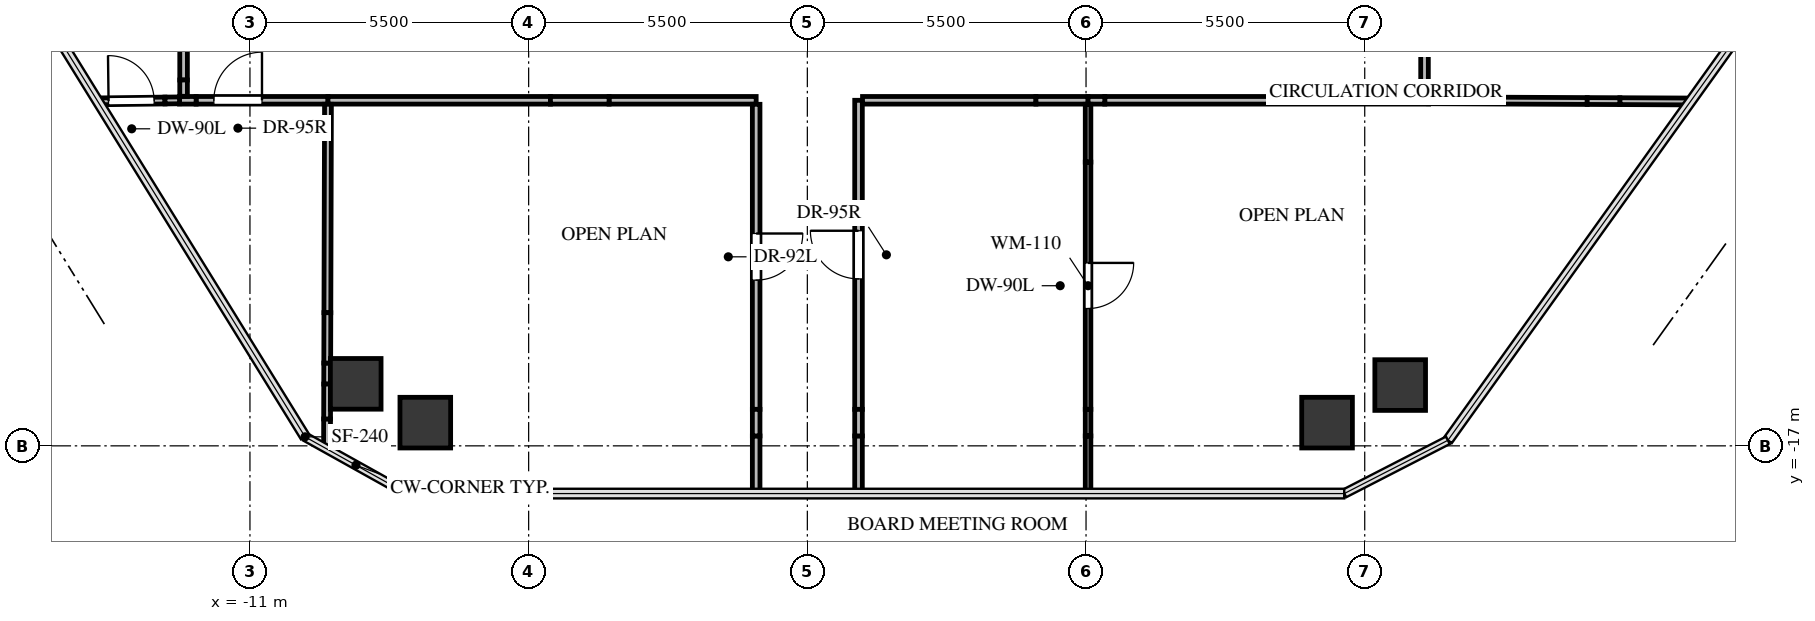
"""IFC4 building model, lengths in metres.
Left out: names, types, materials, properties, quantities, classifications, styles, units other than length and angle.
Written with IfcOpenShell. Run it as: python <this file> out.ifc"""

import sys

from ifc_helpers import new_model, si_unit, direction, frame, frame_2d, origin, origin_2d, place, context, subcontext, project, spatial, rectangle, extrude, source, transform, mapped, element, fill, save


model = new_model("IFC4")
c1 = context("Model", 3, precision=1e-05, world=origin(), true_north=direction((0.0, 1.0)))
c2 = subcontext(c1, "Body", "Model", "MODEL_VIEW")
j1 = project(units=[si_unit("LENGTHUNIT", "METRE"), si_unit("PLANEANGLEUNIT", "RADIAN")], contexts=[c1])
p1 = place(None, origin())
s1 = spatial("IfcSite", under=j1, at=p1, CompositionType="ELEMENT")
p2 = place(p1, origin())
s2 = spatial("IfcBuilding", under=s1, at=p2, CompositionType="ELEMENT")
p3 = place(p2, frame((0.0, 0.0, 200.2)))
s3 = spatial("IfcBuildingStorey", under=s2, at=p3, CompositionType="ELEMENT", Elevation=200.2)
m1 = source(origin(), c2, "Body", "SweptSolid", [
    extrude(rectangle(XDim=1.0, YDim=1.0, at=origin_2d()), origin(), (0.0, 0.0, 1.0), 3.0),
])
for number, where, z_axis, x_axis in (
    (1, (-8.913, -15.776, -0.24), (0.0, 0.0, 1.0), (1.0, 0.0, 0.0)),
    (2, (11.7, -15.8, -0.24), (0.0, 0.0, 1.0), (1.0, 0.0, 0.0)),
    (3, (10.257, -16.542, -0.24), (0.0, 0.0, 1.0), (1.0, 0.0, 0.0)),
    (4, (-7.54, -16.542, -0.24), (0.0, 0.0, 1.0), (1.0, 0.0, 0.0)),
):
    element("IfcColumn", number, at=place(p3, frame(where, z_axis=z_axis, x_axis=x_axis)), inside=s3, PredefinedType="COLUMN", context=c2, shape_type="MappedRepresentation", body=[
        mapped(m1, transform((0.0, 0.0, 0.0), x_axis=(1.0, 0.0, 0.0), y_axis=(0.0, 1.0, 0.0), z_axis=(0.0, 0.0, 1.0), scale=1.0)),
    ])
p4 = place(p3, frame((-12.062, -10.18, 0.0), z_axis=(0.0, 0.0, 1.0), x_axis=(1.0, 0.0, 0.0)))
e5 = element("IfcWall", 5, at=p4, inside=s3, PredefinedType="PARTITIONING", context=c2, shape_type="SweptSolid", body=[
    extrude(rectangle(XDim=2.603, YDim=0.15, at=frame_2d((1.301, 0.0))), origin(), (0.0, 0.0, 1.0), 2.745),
])
p5 = place(p4, frame((0.35, 0.0, 0.0)))
e6 = element("IfcOpeningElement", 6, at=p5, cuts=e5, PredefinedType="OPENING", context=c2, shape_type="SweptSolid", body=[
    extrude(rectangle(XDim=0.95, YDim=2.1, at=frame_2d((0.475, 1.05))), frame((0.0, 0.085, 0.0), z_axis=(0.0, -1.0, 0.0), x_axis=(1.0, 0.0, 0.0)), (0.0, 0.0, 1.0), 0.17),
])
p6 = place(p3, frame((-12.39, -10.18, 0.0), z_axis=(0.0, 0.0, 1.0), x_axis=(1.0, 0.0, 0.0)))
e7 = element("IfcWall", 7, at=p6, inside=s3, PredefinedType="PARTITIONING", context=c2, shape_type="SweptSolid", body=[
    extrude(rectangle(XDim=0.327, YDim=0.15, at=frame_2d((0.164, 0.0))), origin(), (0.0, 0.0, 1.0), 2.099),
])
p7 = place(p3, frame((-9.46, -10.18, 0.0), z_axis=(0.0, 0.0, 1.0), x_axis=(1.0, 0.0, 0.0)))
e8 = element("IfcWall", 8, at=p7, inside=s3, PredefinedType="PARTITIONING", context=c2, shape_type="SweptSolid", body=[
    extrude(rectangle(XDim=4.39, YDim=0.15, at=frame_2d((2.195, 0.0))), origin(), (0.0, 0.0, 1.0), 2.745),
])
p8 = place(p3, frame((-3.913, -10.18, 0.0), z_axis=(0.0, 0.0, 1.0), x_axis=(1.0, 0.0, 0.0)))
e9 = element("IfcWall", 9, at=p8, inside=s3, PredefinedType="PARTITIONING", context=c2, shape_type="SweptSolid", body=[
    extrude(rectangle(XDim=2.903, YDim=0.15, at=frame_2d((1.451, 0.0))), origin(), (0.0, 0.0, 1.0), 2.745),
])
p9 = place(p3, frame((-5.07, -10.18, 0.0), z_axis=(0.0, 0.0, 1.0), x_axis=(1.0, 0.0, 0.0)))
e10 = element("IfcWall", 10, at=p9, inside=s3, PredefinedType="PARTITIONING", context=c2, shape_type="SweptSolid", body=[
    extrude(rectangle(XDim=1.157, YDim=0.15, at=frame_2d((0.579, 0.0))), origin(), (0.0, 0.0, 1.0), 1.942),
])
p10 = place(p3, frame((-1.01, -10.259, 0.0), z_axis=(0.0, 0.0, 1.0), x_axis=(0.0, -1.0, 0.0)))
e11 = element("IfcWall", 11, at=p10, inside=s3, PredefinedType="PARTITIONING", context=c2, shape_type="SweptSolid", body=[
    extrude(rectangle(XDim=6.021, YDim=0.15, at=frame_2d((3.01, 0.0))), origin(), (0.0, 0.0, 1.0), 2.745),
])
p11 = place(p10, frame((2.55, 0.0, 0.0)))
e12 = element("IfcOpeningElement", 12, at=p11, cuts=e11, PredefinedType="OPENING", context=c2, shape_type="SweptSolid", body=[
    extrude(rectangle(XDim=0.92, YDim=2.1, at=frame_2d((0.46, 1.05))), frame((0.0, 0.085, 0.0), z_axis=(0.0, -1.0, 0.0), x_axis=(1.0, 0.0, 0.0)), (0.0, 0.0, 1.0), 0.17),
])
p12 = place(p3, frame((-1.01, -16.804, 0.0), z_axis=(0.0, 0.0, 1.0), x_axis=(0.0, -1.0, 0.0)))
e13 = element("IfcWall", 13, at=p12, inside=s3, PredefinedType="PARTITIONING", context=c2, shape_type="SweptSolid", body=[
    extrude(rectangle(XDim=1.137, YDim=0.15, at=frame_2d((0.569, 0.0))), origin(), (0.0, 0.0, 1.0), 2.745),
])
p13 = place(p3, frame((-1.01, -16.28, 0.0), z_axis=(0.0, 0.0, 1.0), x_axis=(0.0, -1.0, 0.0)))
e14 = element("IfcWall", 14, at=p13, inside=s3, PredefinedType="PARTITIONING", context=c2, shape_type="SweptSolid", body=[
    extrude(rectangle(XDim=0.525, YDim=0.15, at=frame_2d((0.262, 0.0))), origin(), (0.0, 0.0, 1.0), 2.099),
])
p14 = place(p3, frame((1.01, -17.942, 0.0), z_axis=(0.0, 0.0, 1.0), x_axis=(0.0, 1.0, 0.0)))
e15 = element("IfcWall", 15, at=p14, inside=s3, PredefinedType="PARTITIONING", context=c2, shape_type="SweptSolid", body=[
    extrude(rectangle(XDim=1.137, YDim=0.15, at=frame_2d((0.569, 0.0))), origin(), (0.0, 0.0, 1.0), 2.745),
])
p15 = place(p3, frame((1.01, -16.28, 0.0), z_axis=(0.0, 0.0, 1.0), x_axis=(0.0, 1.0, 0.0)))
e16 = element("IfcWall", 16, at=p15, inside=s3, PredefinedType="PARTITIONING", context=c2, shape_type="SweptSolid", body=[
    extrude(rectangle(XDim=6.1, YDim=0.15, at=frame_2d((3.05, 0.0))), origin(), (0.0, 0.0, 1.0), 2.745),
])
p16 = place(p15, frame((2.575, 0.0, 0.0)))
e17 = element("IfcOpeningElement", 17, at=p16, cuts=e16, PredefinedType="OPENING", context=c2, shape_type="SweptSolid", body=[
    extrude(rectangle(XDim=0.95, YDim=2.1, at=frame_2d((0.475, 1.05))), frame((0.0, 0.085, 0.0), z_axis=(0.0, -1.0, 0.0), x_axis=(1.0, 0.0, 0.0)), (0.0, 0.0, 1.0), 0.17),
])
p17 = place(p3, frame((1.01, -16.804, 0.0), z_axis=(0.0, 0.0, 1.0), x_axis=(0.0, 1.0, 0.0)))
e18 = element("IfcWall", 18, at=p17, inside=s3, PredefinedType="PARTITIONING", context=c2, shape_type="SweptSolid", body=[
    extrude(rectangle(XDim=0.525, YDim=0.15, at=frame_2d((0.262, 0.0))), origin(), (0.0, 0.0, 1.0), 2.099),
])
p18 = place(p3, frame((1.089, -10.18, 0.0), z_axis=(0.0, 0.0, 1.0), x_axis=(1.0, 0.0, 0.0)))
e19 = element("IfcWall", 19, at=p18, inside=s3, PredefinedType="PARTITIONING", context=c2, shape_type="SweptSolid", body=[
    extrude(rectangle(XDim=3.422, YDim=0.15, at=frame_2d((1.711, 0.0))), origin(), (0.0, 0.0, 1.0), 1.942),
])
p19 = place(p3, frame((4.511, -10.18, 0.0), z_axis=(0.0, 0.0, 1.0), x_axis=(1.0, 0.0, 0.0)))
e20 = element("IfcWall", 20, at=p19, inside=s3, PredefinedType="PARTITIONING", context=c2, shape_type="SweptSolid", body=[
    extrude(rectangle(XDim=1.029, YDim=0.15, at=frame_2d((0.514, 0.0))), origin(), (0.0, 0.0, 1.0), 1.942),
])
p20 = place(p3, frame((5.87, -10.18, 0.0), z_axis=(0.0, 0.0, 1.0), x_axis=(1.0, 0.0, 0.0)))
e21 = element("IfcWall", 21, at=p20, inside=s3, PredefinedType="PARTITIONING", context=c2, shape_type="SweptSolid", body=[
    extrude(rectangle(XDim=6.39, YDim=0.15, at=frame_2d((3.195, 0.0))), origin(), (0.0, 0.0, 1.0), 1.942),
])
p21 = place(p3, frame((5.54, -10.18, 0.0), z_axis=(0.0, 0.0, 1.0), x_axis=(1.0, 0.0, 0.0)))
e22 = element("IfcWall", 22, at=p21, inside=s3, PredefinedType="PARTITIONING", context=c2, shape_type="SweptSolid", body=[
    extrude(rectangle(XDim=0.33, YDim=0.15, at=frame_2d((0.165, 0.0))), origin(), (0.0, 0.0, 1.0), 1.942),
])
p22 = place(p3, frame((-12.31, -8.919, 0.0), z_axis=(0.0, 0.0, 1.0), x_axis=(0.0, -1.0, 0.0)))
e23 = element("IfcWall", 23, at=p22, inside=s3, PredefinedType="PARTITIONING", context=c2, shape_type="SweptSolid", body=[
    extrude(rectangle(XDim=0.86, YDim=0.15, at=frame_2d((0.43, 0.0))), origin(), (0.0, 0.0, 1.0), 2.099),
])
p23 = place(p3, frame((-12.31, -9.779, 0.0), z_axis=(0.0, 0.0, 1.0), x_axis=(0.0, -1.0, 0.0)))
e24 = element("IfcWall", 24, at=p23, inside=s3, PredefinedType="PARTITIONING", context=c2, shape_type="SweptSolid", body=[
    extrude(rectangle(XDim=0.322, YDim=0.15, at=frame_2d((0.161, 0.0))), origin(), (0.0, 0.0, 1.0), 2.099),
])
p24 = place(p3, frame((12.18, -10.101, 0.0), z_axis=(0.0, 0.0, 1.0), x_axis=(0.0, 1.0, 0.0)))
e25 = element("IfcWall", 25, at=p24, inside=s3, PredefinedType="PARTITIONING", context=c2, shape_type="SweptSolid", body=[
    extrude(rectangle(XDim=1.661, YDim=0.15, at=frame_2d((0.831, 0.0))), origin(), (0.0, 0.0, 1.0), 2.745),
])
p25 = place(p3, frame((-9.46, -10.259, 0.0), z_axis=(0.0, 0.0, 1.0), x_axis=(-0.002849160395, -0.999995941134, 0.0)))
e26 = element("IfcWall", 26, at=p25, inside=s3, PredefinedType="PARTITIONING", context=c2, shape_type="SweptSolid", body=[
    extrude(rectangle(XDim=4.113, YDim=0.135, at=frame_2d((2.057, 0.0))), origin(), (0.0, 0.0, 1.0), 2.099),
])
p26 = place(p3, frame((-9.475, -15.366, 0.0), z_axis=(0.0, 0.0, 1.0), x_axis=(-0.002946363169, -0.999995659463, 0.0)))
e27 = element("IfcWall", 27, at=p26, inside=s3, PredefinedType="PARTITIONING", context=c2, shape_type="SweptSolid", body=[
    extrude(rectangle(XDim=0.414, YDim=0.135, at=frame_2d((0.207, 0.0))), origin(), (0.0, 0.0, 1.0), 2.099),
])
p27 = place(p3, frame((-9.478, -16.469, 0.0), z_axis=(0.0, 0.0, 1.0), x_axis=(-0.002877094545, -0.999995861155, 0.0)))
e28 = element("IfcWall", 28, at=p27, inside=s3, PredefinedType="PARTITIONING", context=c2, shape_type="SweptSolid", body=[
    extrude(rectangle(XDim=0.594, YDim=0.135, at=frame_2d((0.297, 0.0))), origin(), (0.0, 0.0, 1.0), 2.745),
])
p28 = place(p3, frame((-9.472, -14.372, 0.0), z_axis=(0.0, 0.0, 1.0), x_axis=(-0.002701365389, -0.999996351306, 0.0)))
e29 = element("IfcWall", 29, at=p28, inside=s3, PredefinedType="PARTITIONING", context=c2, shape_type="SweptSolid", body=[
    extrude(rectangle(XDim=0.994, YDim=0.135, at=frame_2d((0.497, 0.0))), origin(), (0.0, 0.0, 1.0), 2.099),
])
p29 = place(p3, frame((-9.476, -15.781, 0.0), z_axis=(0.0, 0.0, 1.0), x_axis=(-0.0028358624, -0.999995978934, 0.0)))
e30 = element("IfcWall", 30, at=p29, inside=s3, PredefinedType="PARTITIONING", context=c2, shape_type="SweptSolid", body=[
    extrude(rectangle(XDim=0.689, YDim=0.135, at=frame_2d((0.344, 0.0))), origin(), (0.0, 0.0, 1.0), 1.577),
])
p30 = place(p3, frame((-14.004, -10.201, 0.0), z_axis=(0.0, 0.0, 1.0), x_axis=(0.999924024946, 0.012326570317, 0.0)))
e31 = element("IfcWall", 31, at=p30, inside=s3, PredefinedType="PARTITIONING", context=c2, shape_type="SweptSolid", body=[
    extrude(rectangle(XDim=1.327, YDim=0.135, at=frame_2d((0.664, 0.0))), origin(), (0.0, 0.0, 1.0), 2.745),
])
p31 = place(p30, frame((0.214, 0.0, 0.0)))
e32 = element("IfcOpeningElement", 32, at=p31, cuts=e31, PredefinedType="OPENING", context=c2, shape_type="SweptSolid", body=[
    extrude(rectangle(XDim=0.9, YDim=2.05, at=frame_2d((0.45, 1.025))), frame((0.0, 0.078, 0.0), z_axis=(0.0, -1.0, 0.0), x_axis=(1.0, 0.0, 0.0)), (0.0, 0.0, 1.0), 0.155),
])
p32 = place(p3, frame((-12.677, -10.185, 0.0), z_axis=(0.0, 0.0, 1.0), x_axis=(0.99991866361, 0.012754064587, 0.0)))
e33 = element("IfcWall", 33, at=p32, inside=s3, PredefinedType="PARTITIONING", context=c2, shape_type="SweptSolid", body=[
    extrude(rectangle(XDim=0.287, YDim=0.135, at=frame_2d((0.144, 0.0))), origin(), (0.0, 0.0, 1.0), 2.099),
])
p33 = place(p3, frame((5.54, -11.4, 0.0), z_axis=(0.0, 0.0, 1.0), x_axis=(0.0, -1.0, 0.0)))
e34 = element("IfcWall", 34, at=p33, inside=s3, PredefinedType="MOVABLE", context=c2, shape_type="SweptSolid", body=[
    extrude(rectangle(XDim=4.88, YDim=0.11, at=frame_2d((2.44, 0.0))), origin(), (0.0, 0.0, 1.0), 2.745),
])
p34 = place(p33, frame((1.99, 0.0, 0.0)))
e35 = element("IfcOpeningElement", 35, at=p34, cuts=e34, PredefinedType="OPENING", context=c2, shape_type="SweptSolid", body=[
    extrude(rectangle(XDim=0.9, YDim=2.05, at=frame_2d((0.45, 1.025))), frame((0.0, 0.065, 0.0), z_axis=(0.0, -1.0, 0.0), x_axis=(1.0, 0.0, 0.0)), (0.0, 0.0, 1.0), 0.13),
])
p35 = place(p3, frame((5.54, -16.804, 0.0), z_axis=(0.0, 0.0, 1.0), x_axis=(0.0, -1.0, 0.0)))
e36 = element("IfcWall", 36, at=p35, inside=s3, PredefinedType="MOVABLE", context=c2, shape_type="SweptSolid", body=[
    extrude(rectangle(XDim=1.137, YDim=0.11, at=frame_2d((0.569, 0.0))), origin(), (0.0, 0.0, 1.0), 2.745),
])
p36 = place(p3, frame((5.54, -10.259, 0.0), z_axis=(0.0, 0.0, 1.0), x_axis=(0.0, -1.0, 0.0)))
e37 = element("IfcWall", 37, at=p36, inside=s3, PredefinedType="MOVABLE", context=c2, shape_type="SweptSolid", body=[
    extrude(rectangle(XDim=1.141, YDim=0.11, at=frame_2d((0.57, 0.0))), origin(), (0.0, 0.0, 1.0), 1.942),
])
p37 = place(p3, frame((5.54, -16.28, 0.0), z_axis=(0.0, 0.0, 1.0), x_axis=(0.0, -1.0, 0.0)))
e38 = element("IfcWall", 38, at=p37, inside=s3, PredefinedType="MOVABLE", context=c2, shape_type="SweptSolid", body=[
    extrude(rectangle(XDim=0.525, YDim=0.11, at=frame_2d((0.262, 0.0))), origin(), (0.0, 0.0, 1.0), 2.099),
])
p38 = place(p3, frame((12.26, -10.18, 0.0), z_axis=(0.0, 0.0, 1.0), x_axis=(0.999990120522, -0.004445093728, 0.0)))
e39 = element("IfcWall", 39, at=p38, inside=s3, PredefinedType="PARTITIONING", context=c2, shape_type="SweptSolid", body=[
    extrude(rectangle(XDim=3.131, YDim=0.135, at=frame_2d((1.565, 0.0))), origin(), (0.0, 0.0, 1.0), 2.745),
])
p39 = place(p3, frame((16.034, -10.197, 0.0), z_axis=(0.0, 0.0, 1.0), x_axis=(0.999989640625, -0.004551773574, 0.0)))
e40 = element("IfcWall", 40, at=p39, inside=s3, PredefinedType="PARTITIONING", context=c2, shape_type="SweptSolid", body=[
    extrude(rectangle(XDim=1.395, YDim=0.135, at=frame_2d((0.697, 0.0))), origin(), (0.0, 0.0, 1.0), 2.745),
])
p40 = place(p3, frame((15.391, -10.194, 0.0), z_axis=(0.0, 0.0, 1.0), x_axis=(0.999991299796, -0.00417137061, 0.0)))
e41 = element("IfcWall", 41, at=p40, inside=s3, PredefinedType="PARTITIONING", context=c2, shape_type="SweptSolid", body=[
    extrude(rectangle(XDim=0.644, YDim=0.135, at=frame_2d((0.322, 0.0))), origin(), (0.0, 0.0, 1.0), 2.099),
])
m2 = source(origin(), c2, "Body", "SweptSolid", [
    extrude(rectangle(XDim=0.95, YDim=2.1, at=frame_2d((0.475, 1.05))), frame((0.0, 0.025, 0.0), z_axis=(0.0, -1.0, 0.0), x_axis=(1.0, 0.0, 0.0)), (0.0, 0.0, 1.0), 0.05),
])
p41 = place(p5, origin())
e42 = element("IfcDoor", 42, at=p41, inside=s3, OperationType="SINGLE_SWING_RIGHT", PredefinedType="DOOR", context=c2, shape_type="MappedRepresentation", body=[
    mapped(m2, transform((0.0, 0.0, 0.0), x_axis=(1.0, 0.0, 0.0), y_axis=(0.0, 1.0, 0.0), z_axis=(0.0, 0.0, 1.0), scale=1.0)),
])
fill(e6, e42)
m3 = source(origin(), c2, "Body", "SweptSolid", [
    extrude(rectangle(XDim=0.92, YDim=2.1, at=frame_2d((0.46, 1.05))), frame((0.0, 0.025, 0.0), z_axis=(0.0, -1.0, 0.0), x_axis=(1.0, 0.0, 0.0)), (0.0, 0.0, 1.0), 0.05),
])
p42 = place(p11, origin())
e43 = element("IfcDoor", 43, at=p42, inside=s3, OperationType="SINGLE_SWING_LEFT", PredefinedType="DOOR", context=c2, shape_type="MappedRepresentation", body=[
    mapped(m3, transform((0.0, 0.0, 0.0), x_axis=(1.0, 0.0, 0.0), y_axis=(0.0, 1.0, 0.0), z_axis=(0.0, 0.0, 1.0), scale=1.0)),
])
fill(e12, e43)
p43 = place(p16, origin())
e44 = element("IfcDoor", 44, at=p43, inside=s3, OperationType="SINGLE_SWING_RIGHT", PredefinedType="DOOR", context=c2, shape_type="MappedRepresentation", body=[
    mapped(m2, transform((0.0, 0.0, 0.0), x_axis=(1.0, 0.0, 0.0), y_axis=(0.0, 1.0, 0.0), z_axis=(0.0, 0.0, 1.0), scale=1.0)),
])
fill(e17, e44)
m4 = source(origin(), c2, "Body", "SweptSolid", [
    extrude(rectangle(XDim=0.9, YDim=2.05, at=frame_2d((0.45, 1.025))), frame((0.0, 0.025, 0.0), z_axis=(0.0, -1.0, 0.0), x_axis=(1.0, 0.0, 0.0)), (0.0, 0.0, 1.0), 0.05),
])
p44 = place(p31, origin())
e45 = element("IfcDoor", 45, at=p44, inside=s3, OperationType="SINGLE_SWING_LEFT", PredefinedType="DOOR", context=c2, shape_type="MappedRepresentation", body=[
    mapped(m4, transform((0.0, 0.0, 0.0), x_axis=(1.0, 0.0, 0.0), y_axis=(0.0, 1.0, 0.0), z_axis=(0.0, 0.0, 1.0), scale=1.0)),
])
fill(e32, e45)
p45 = place(p34, origin())
e46 = element("IfcDoor", 46, at=p45, inside=s3, OperationType="SINGLE_SWING_LEFT", PredefinedType="DOOR", context=c2, shape_type="MappedRepresentation", body=[
    mapped(m4, transform((0.0, 0.0, 0.0), x_axis=(1.0, 0.0, 0.0), y_axis=(0.0, 1.0, 0.0), z_axis=(0.0, 0.0, 1.0), scale=1.0)),
])
fill(e35, e46)
save(model, sys.argv[1])
